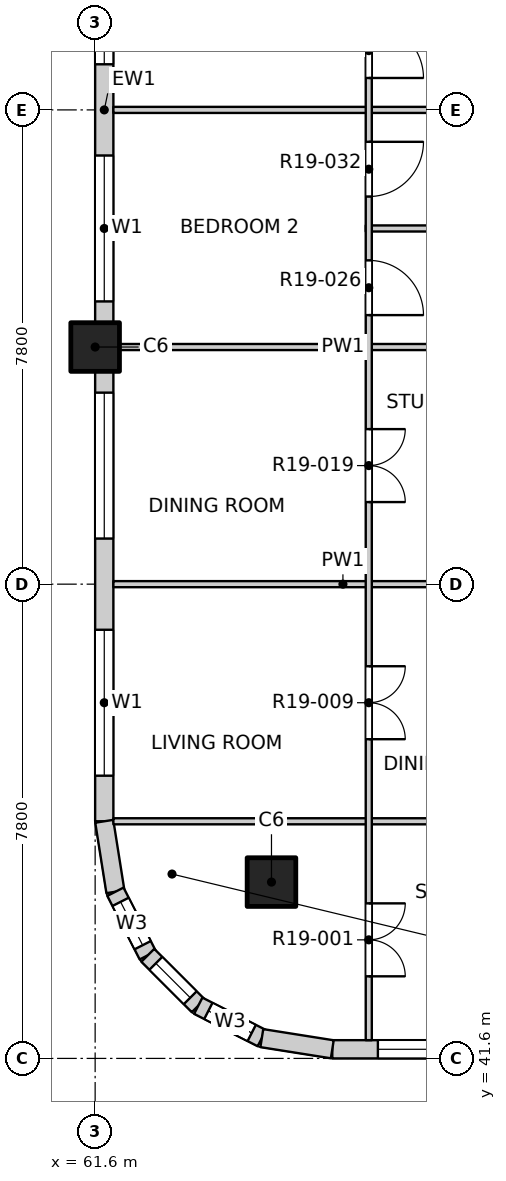
"""IFC4 building model, lengths in metres.
Left out: names, types, materials, properties, quantities, classifications, styles, units other than length and angle.
Written with IfcOpenShell. Run it as: python <this file> out.ifc"""

import sys

from ifc_helpers import new_model, si_unit, direction, frame, frame_2d, origin, origin_2d, place, context, subcontext, project, spatial, rectangle, extrude, element, fill, save


model = new_model("IFC4")
c1 = context("Model", 3, precision=1e-05, world=origin(), true_north=direction((0.0, 1.0)))
c2 = subcontext(c1, "Body", "Model", "MODEL_VIEW")
j1 = project(units=[si_unit("LENGTHUNIT", "METRE"), si_unit("PLANEANGLEUNIT", "RADIAN")], contexts=[c1])
p1 = place(None, origin())
s1 = spatial("IfcSite", under=j1, at=p1, CompositionType="ELEMENT")
p2 = place(p1, origin())
s2 = spatial("IfcBuilding", under=s1, at=p2, CompositionType="ELEMENT")
p3 = place(p2, frame((0.0, 0.0, 197.3)))
s3 = spatial("IfcBuildingStorey", under=s2, at=p3, CompositionType="ELEMENT", Elevation=197.3)
for number, where, z_axis, x_axis in (
    (1, (64.5, 44.5, -0.3), (0.0, 0.0, 1.0), (1.0, 0.0, 0.0)),
    (2, (61.6, 53.3, -0.3), (0.0, 0.0, 1.0), (1.0, 0.0, 0.0)),
):
    element("IfcColumn", number, at=place(p3, frame(where, z_axis=z_axis, x_axis=x_axis)), inside=s3, PredefinedType="COLUMN", context=c2, shape_type="SweptSolid", body=[
        extrude(rectangle(XDim=0.8, YDim=0.8, at=origin_2d()), origin(), (0.0, 0.0, 1.0), 3.45),
    ])
p4 = place(p3, frame((65.5, 41.75, 0.0), z_axis=(0.0, 0.0, 1.0), x_axis=(1.0, 0.0, 0.0)))
e3 = element("IfcWall", 3, at=p4, inside=s3, PredefinedType="SOLIDWALL", context=c2, shape_type="SweptSolid", body=[
    extrude(rectangle(XDim=7.4, YDim=0.3, at=frame_2d((3.7, 0.0))), origin(), (0.0, 0.0, 1.0), 2.7),
])
p5 = place(p4, frame((0.75, 0.0, 0.9)))
e4 = element("IfcOpeningElement", 4, at=p5, cuts=e3, PredefinedType="OPENING", context=c2, shape_type="SweptSolid", body=[
    extrude(rectangle(XDim=2.4, YDim=1.8, at=frame_2d((1.2, 0.9))), frame((0.0, 0.16, 0.0), z_axis=(0.0, -1.0, 0.0), x_axis=(1.0, 0.0, 0.0)), (0.0, 0.0, 1.0), 0.32),
])
p6 = place(p4, frame((4.65, 0.0, 0.9)))
e5 = element("IfcOpeningElement", 5, at=p6, cuts=e3, PredefinedType="OPENING", context=c2, shape_type="SweptSolid", body=[
    extrude(rectangle(XDim=2.4, YDim=1.8, at=frame_2d((1.2, 0.9))), frame((0.0, 0.16, 0.0), z_axis=(0.0, -1.0, 0.0), x_axis=(1.0, 0.0, 0.0)), (0.0, 0.0, 1.0), 0.32),
])
p7 = place(p3, frame((61.75, 45.5, 0.0), z_axis=(0.0, 0.0, 1.0), x_axis=(0.0, 1.0, 0.0)))
e6 = element("IfcWall", 6, at=p7, inside=s3, PredefinedType="SOLIDWALL", context=c2, shape_type="SweptSolid", body=[
    extrude(rectangle(XDim=7.4, YDim=0.3, at=frame_2d((3.7, 0.0))), origin(), (0.0, 0.0, 1.0), 2.7),
])
p8 = place(p7, frame((0.75, 0.0, 0.9)))
e7 = element("IfcOpeningElement", 7, at=p8, cuts=e6, PredefinedType="OPENING", context=c2, shape_type="SweptSolid", body=[
    extrude(rectangle(XDim=2.4, YDim=1.8, at=frame_2d((1.2, 0.9))), frame((0.0, 0.16, 0.0), z_axis=(0.0, -1.0, 0.0), x_axis=(1.0, 0.0, 0.0)), (0.0, 0.0, 1.0), 0.32),
])
p9 = place(p7, frame((4.65, 0.0, 0.9)))
e8 = element("IfcOpeningElement", 8, at=p9, cuts=e6, PredefinedType="OPENING", context=c2, shape_type="SweptSolid", body=[
    extrude(rectangle(XDim=2.4, YDim=1.8, at=frame_2d((1.2, 0.9))), frame((0.0, 0.16, 0.0), z_axis=(0.0, -1.0, 0.0), x_axis=(1.0, 0.0, 0.0)), (0.0, 0.0, 1.0), 0.32),
])
p10 = place(p3, frame((61.75, 53.7, 0.0), z_axis=(0.0, 0.0, 1.0), x_axis=(0.0, 1.0, 0.0)))
e9 = element("IfcWall", 9, at=p10, inside=s3, PredefinedType="SOLIDWALL", context=c2, shape_type="SweptSolid", body=[
    extrude(rectangle(XDim=7.0, YDim=0.3, at=frame_2d((3.5, 0.0))), origin(), (0.0, 0.0, 1.0), 2.7),
])
p11 = place(p10, frame((0.35, 0.0, 0.9)))
e10 = element("IfcOpeningElement", 10, at=p11, cuts=e9, PredefinedType="OPENING", context=c2, shape_type="SweptSolid", body=[
    extrude(rectangle(XDim=2.4, YDim=1.8, at=frame_2d((1.2, 0.9))), frame((0.0, 0.16, 0.0), z_axis=(0.0, -1.0, 0.0), x_axis=(1.0, 0.0, 0.0)), (0.0, 0.0, 1.0), 0.32),
])
p12 = place(p10, frame((4.25, 0.0, 0.9)))
e11 = element("IfcOpeningElement", 11, at=p12, cuts=e9, PredefinedType="OPENING", context=c2, shape_type="SweptSolid", body=[
    extrude(rectangle(XDim=2.4, YDim=1.8, at=frame_2d((1.2, 0.9))), frame((0.0, 0.16, 0.0), z_axis=(0.0, -1.0, 0.0), x_axis=(1.0, 0.0, 0.0)), (0.0, 0.0, 1.0), 0.32),
])
p13 = place(p3, frame((61.75, 45.5, 0.0), z_axis=(0.0, 0.0, 1.0), x_axis=(0.156496880861, -0.987678452879, 0.0)))
e12 = element("IfcWall", 12, at=p13, inside=s3, PredefinedType="SOLIDWALL", context=c2, shape_type="SweptSolid", body=[
    extrude(rectangle(XDim=1.173, YDim=0.3, at=frame_2d((0.586, 0.0))), origin(), (0.0, 0.0, 1.0), 2.7),
])
p14 = place(p3, frame((61.934, 44.341, 0.0), z_axis=(0.0, 0.0, 1.0), x_axis=(0.454025524128, -0.890988677504, 0.0)))
e13 = element("IfcWall", 13, at=p14, inside=s3, PredefinedType="SOLIDWALL", context=c2, shape_type="SweptSolid", body=[
    extrude(rectangle(XDim=1.173, YDim=0.3, at=frame_2d((0.587, 0.0))), origin(), (0.0, 0.0, 1.0), 2.7),
])
p15 = place(p14, frame((0.187, 0.0, 0.9)))
e14 = element("IfcOpeningElement", 14, at=p15, cuts=e13, PredefinedType="OPENING", context=c2, shape_type="SweptSolid", body=[
    extrude(rectangle(XDim=0.8, YDim=1.2, at=frame_2d((0.4, 0.6))), frame((0.0, 0.16, 0.0), z_axis=(0.0, -1.0, 0.0), x_axis=(1.0, 0.0, 0.0)), (0.0, 0.0, 1.0), 0.32),
])
p16 = place(p3, frame((62.466, 43.296, 0.0), z_axis=(0.0, 0.0, 1.0), x_axis=(0.707106781187, -0.707106781187, 0.0)))
e15 = element("IfcWall", 15, at=p16, inside=s3, PredefinedType="SOLIDWALL", context=c2, shape_type="SweptSolid", body=[
    extrude(rectangle(XDim=1.173, YDim=0.3, at=frame_2d((0.586, 0.0))), origin(), (0.0, 0.0, 1.0), 2.7),
])
p17 = place(p16, frame((0.187, 0.0, 0.9)))
e16 = element("IfcOpeningElement", 16, at=p17, cuts=e15, PredefinedType="OPENING", context=c2, shape_type="SweptSolid", body=[
    extrude(rectangle(XDim=0.8, YDim=1.2, at=frame_2d((0.4, 0.6))), frame((0.0, 0.16, 0.0), z_axis=(0.0, -1.0, 0.0), x_axis=(1.0, 0.0, 0.0)), (0.0, 0.0, 1.0), 0.32),
])
p18 = place(p3, frame((63.296, 42.466, 0.0), z_axis=(0.0, 0.0, 1.0), x_axis=(0.890988677504, -0.454025524128, 0.0)))
e17 = element("IfcWall", 17, at=p18, inside=s3, PredefinedType="SOLIDWALL", context=c2, shape_type="SweptSolid", body=[
    extrude(rectangle(XDim=1.173, YDim=0.3, at=frame_2d((0.587, 0.0))), origin(), (0.0, 0.0, 1.0), 2.7),
])
p19 = place(p18, frame((0.187, 0.0, 0.9)))
e18 = element("IfcOpeningElement", 18, at=p19, cuts=e17, PredefinedType="OPENING", context=c2, shape_type="SweptSolid", body=[
    extrude(rectangle(XDim=0.8, YDim=1.2, at=frame_2d((0.4, 0.6))), frame((0.0, 0.16, 0.0), z_axis=(0.0, -1.0, 0.0), x_axis=(1.0, 0.0, 0.0)), (0.0, 0.0, 1.0), 0.32),
])
p20 = place(p3, frame((64.341, 41.934, 0.0), z_axis=(0.0, 0.0, 1.0), x_axis=(0.987678452879, -0.156496880861, 0.0)))
e19 = element("IfcWall", 19, at=p20, inside=s3, PredefinedType="SOLIDWALL", context=c2, shape_type="SweptSolid", body=[
    extrude(rectangle(XDim=1.173, YDim=0.3, at=frame_2d((0.586, 0.0))), origin(), (0.0, 0.0, 1.0), 2.7),
])
p21 = place(p3, frame((61.9, 45.5, 0.0), z_axis=(0.0, 0.0, 1.0), x_axis=(1.0, 0.0, 0.0)))
e20 = element("IfcWall", 20, at=p21, inside=s3, PredefinedType="PARTITIONING", context=c2, shape_type="SweptSolid", body=[
    extrude(rectangle(XDim=11.475, YDim=0.1, at=frame_2d((5.737, 0.0))), origin(), (0.0, 0.0, 1.0), 3.15),
])
p22 = place(p21, frame((7.965, 0.0, 0.0)))
e21 = element("IfcOpeningElement", 21, at=p22, cuts=e20, PredefinedType="OPENING", context=c2, shape_type="SweptSolid", body=[
    extrude(rectangle(XDim=0.9, YDim=2.1, at=frame_2d((0.45, 1.05))), frame((0.0, 0.06, 0.0), z_axis=(0.0, -1.0, 0.0), x_axis=(1.0, 0.0, 0.0)), (0.0, 0.0, 1.0), 0.12),
])
for number, where, z_axis, x_axis in (
    (22, (61.9, 49.4, 0.0), (0.0, 0.0, 1.0), (1.0, 0.0, 0.0)),
    (23, (61.9, 53.3, 0.0), (0.0, 0.0, 1.0), (1.0, 0.0, 0.0)),
):
    element("IfcWall", number, at=place(p3, frame(where, z_axis=z_axis, x_axis=x_axis)), inside=s3, PredefinedType="PARTITIONING", context=c2, shape_type="SweptSolid", body=[
        extrude(rectangle(XDim=7.55, YDim=0.1, at=frame_2d((3.775, 0.0))), origin(), (0.0, 0.0, 1.0), 3.15),
    ])
p23 = place(p3, frame((66.05, 55.25, 0.0), z_axis=(0.0, 0.0, 1.0), x_axis=(1.0, 0.0, 0.0)))
e24 = element("IfcWall", 24, at=p23, inside=s3, PredefinedType="PARTITIONING", context=c2, shape_type="SweptSolid", body=[
    extrude(rectangle(XDim=3.4, YDim=0.1, at=frame_2d((1.7, 0.0))), origin(), (0.0, 0.0, 1.0), 3.15),
])
p24 = place(p3, frame((61.9, 57.2, 0.0), z_axis=(0.0, 0.0, 1.0), x_axis=(1.0, 0.0, 0.0)))
e25 = element("IfcWall", 25, at=p24, inside=s3, PredefinedType="PARTITIONING", context=c2, shape_type="SweptSolid", body=[
    extrude(rectangle(XDim=7.55, YDim=0.1, at=frame_2d((3.775, 0.0))), origin(), (0.0, 0.0, 1.0), 3.15),
])
p25 = place(p3, frame((66.1, 41.9, 0.0), z_axis=(0.0, 0.0, 1.0), x_axis=(0.0, 1.0, 0.0)))
e26 = element("IfcWall", 26, at=p25, inside=s3, PredefinedType="PARTITIONING", context=c2, shape_type="SweptSolid", body=[
    extrude(rectangle(XDim=19.1, YDim=0.1, at=frame_2d((9.55, 0.0))), origin(), (0.0, 0.0, 1.0), 3.15),
])
p26 = place(p25, frame((1.05, 0.0, 0.0)))
e27 = element("IfcOpeningElement", 27, at=p26, cuts=e26, PredefinedType="OPENING", context=c2, shape_type="SweptSolid", body=[
    extrude(rectangle(XDim=1.2, YDim=2.1, at=frame_2d((0.6, 1.05))), frame((0.0, 0.06, 0.0), z_axis=(0.0, -1.0, 0.0), x_axis=(1.0, 0.0, 0.0)), (0.0, 0.0, 1.0), 0.12),
])
p27 = place(p25, frame((4.95, 0.0, 0.0)))
e28 = element("IfcOpeningElement", 28, at=p27, cuts=e26, PredefinedType="OPENING", context=c2, shape_type="SweptSolid", body=[
    extrude(rectangle(XDim=1.2, YDim=2.1, at=frame_2d((0.6, 1.05))), frame((0.0, 0.06, 0.0), z_axis=(0.0, -1.0, 0.0), x_axis=(1.0, 0.0, 0.0)), (0.0, 0.0, 1.0), 0.12),
])
p28 = place(p25, frame((8.85, 0.0, 0.0)))
e29 = element("IfcOpeningElement", 29, at=p28, cuts=e26, PredefinedType="OPENING", context=c2, shape_type="SweptSolid", body=[
    extrude(rectangle(XDim=1.2, YDim=2.1, at=frame_2d((0.6, 1.05))), frame((0.0, 0.06, 0.0), z_axis=(0.0, -1.0, 0.0), x_axis=(1.0, 0.0, 0.0)), (0.0, 0.0, 1.0), 0.12),
])
p29 = place(p25, frame((11.925, 0.0, 0.0)))
e30 = element("IfcOpeningElement", 30, at=p29, cuts=e26, PredefinedType="OPENING", context=c2, shape_type="SweptSolid", body=[
    extrude(rectangle(XDim=0.9, YDim=2.1, at=frame_2d((0.45, 1.05))), frame((0.0, 0.06, 0.0), z_axis=(0.0, -1.0, 0.0), x_axis=(1.0, 0.0, 0.0)), (0.0, 0.0, 1.0), 0.12),
])
p30 = place(p25, frame((13.875, 0.0, 0.0)))
e31 = element("IfcOpeningElement", 31, at=p30, cuts=e26, PredefinedType="OPENING", context=c2, shape_type="SweptSolid", body=[
    extrude(rectangle(XDim=0.9, YDim=2.1, at=frame_2d((0.45, 1.05))), frame((0.0, 0.06, 0.0), z_axis=(0.0, -1.0, 0.0), x_axis=(1.0, 0.0, 0.0)), (0.0, 0.0, 1.0), 0.12),
])
p31 = place(p25, frame((15.825, 0.0, 0.0)))
e32 = element("IfcOpeningElement", 32, at=p31, cuts=e26, PredefinedType="OPENING", context=c2, shape_type="SweptSolid", body=[
    extrude(rectangle(XDim=0.9, YDim=2.1, at=frame_2d((0.45, 1.05))), frame((0.0, 0.06, 0.0), z_axis=(0.0, -1.0, 0.0), x_axis=(1.0, 0.0, 0.0)), (0.0, 0.0, 1.0), 0.12),
])
p32 = place(p25, frame((17.775, 0.0, 0.0)))
e33 = element("IfcOpeningElement", 33, at=p32, cuts=e26, PredefinedType="OPENING", context=c2, shape_type="SweptSolid", body=[
    extrude(rectangle(XDim=0.9, YDim=2.1, at=frame_2d((0.45, 1.05))), frame((0.0, 0.06, 0.0), z_axis=(0.0, -1.0, 0.0), x_axis=(1.0, 0.0, 0.0)), (0.0, 0.0, 1.0), 0.12),
])
p33 = place(p5, origin())
e34 = element("IfcWindow", 34, at=p33, inside=s3, PartitioningType="DOUBLE_PANEL_VERTICAL", PredefinedType="WINDOW", context=c2, shape_type="SweptSolid", body=[
    extrude(rectangle(XDim=2.4, YDim=1.8, at=frame_2d((1.2, 0.9))), frame((0.0, 0.03, 0.0), z_axis=(0.0, -1.0, 0.0), x_axis=(1.0, 0.0, 0.0)), (0.0, 0.0, 1.0), 0.06),
])
fill(e4, e34)
p34 = place(p8, origin())
e35 = element("IfcWindow", 35, at=p34, inside=s3, PartitioningType="DOUBLE_PANEL_VERTICAL", PredefinedType="WINDOW", context=c2, shape_type="SweptSolid", body=[
    extrude(rectangle(XDim=2.4, YDim=1.8, at=frame_2d((1.2, 0.9))), frame((0.0, 0.03, 0.0), z_axis=(0.0, -1.0, 0.0), x_axis=(1.0, 0.0, 0.0)), (0.0, 0.0, 1.0), 0.06),
])
fill(e7, e35)
p35 = place(p9, origin())
e36 = element("IfcWindow", 36, at=p35, inside=s3, PartitioningType="DOUBLE_PANEL_VERTICAL", PredefinedType="WINDOW", context=c2, shape_type="SweptSolid", body=[
    extrude(rectangle(XDim=2.4, YDim=1.8, at=frame_2d((1.2, 0.9))), frame((0.0, 0.03, 0.0), z_axis=(0.0, -1.0, 0.0), x_axis=(1.0, 0.0, 0.0)), (0.0, 0.0, 1.0), 0.06),
])
fill(e8, e36)
p36 = place(p11, origin())
e37 = element("IfcWindow", 37, at=p36, inside=s3, PartitioningType="DOUBLE_PANEL_VERTICAL", PredefinedType="WINDOW", context=c2, shape_type="SweptSolid", body=[
    extrude(rectangle(XDim=2.4, YDim=1.8, at=frame_2d((1.2, 0.9))), frame((0.0, 0.03, 0.0), z_axis=(0.0, -1.0, 0.0), x_axis=(1.0, 0.0, 0.0)), (0.0, 0.0, 1.0), 0.06),
])
fill(e10, e37)
p37 = place(p12, origin())
e38 = element("IfcWindow", 38, at=p37, inside=s3, PartitioningType="DOUBLE_PANEL_VERTICAL", PredefinedType="WINDOW", context=c2, shape_type="SweptSolid", body=[
    extrude(rectangle(XDim=2.4, YDim=1.8, at=frame_2d((1.2, 0.9))), frame((0.0, 0.03, 0.0), z_axis=(0.0, -1.0, 0.0), x_axis=(1.0, 0.0, 0.0)), (0.0, 0.0, 1.0), 0.06),
])
fill(e11, e38)
p38 = place(p15, origin())
e39 = element("IfcWindow", 39, at=p38, inside=s3, PartitioningType="SINGLE_PANEL", PredefinedType="WINDOW", context=c2, shape_type="SweptSolid", body=[
    extrude(rectangle(XDim=0.8, YDim=1.2, at=frame_2d((0.4, 0.6))), frame((0.0, 0.03, 0.0), z_axis=(0.0, -1.0, 0.0), x_axis=(1.0, 0.0, 0.0)), (0.0, 0.0, 1.0), 0.06),
])
fill(e14, e39)
p39 = place(p17, origin())
e40 = element("IfcWindow", 40, at=p39, inside=s3, PartitioningType="SINGLE_PANEL", PredefinedType="WINDOW", context=c2, shape_type="SweptSolid", body=[
    extrude(rectangle(XDim=0.8, YDim=1.2, at=frame_2d((0.4, 0.6))), frame((0.0, 0.03, 0.0), z_axis=(0.0, -1.0, 0.0), x_axis=(1.0, 0.0, 0.0)), (0.0, 0.0, 1.0), 0.06),
])
fill(e16, e40)
p40 = place(p19, origin())
e41 = element("IfcWindow", 41, at=p40, inside=s3, PartitioningType="SINGLE_PANEL", PredefinedType="WINDOW", context=c2, shape_type="SweptSolid", body=[
    extrude(rectangle(XDim=0.8, YDim=1.2, at=frame_2d((0.4, 0.6))), frame((0.0, 0.03, 0.0), z_axis=(0.0, -1.0, 0.0), x_axis=(1.0, 0.0, 0.0)), (0.0, 0.0, 1.0), 0.06),
])
fill(e18, e41)
p41 = place(p26, origin())
e42 = element("IfcDoor", 42, at=p41, inside=s3, OperationType="DOUBLE_DOOR_SINGLE_SWING", PredefinedType="DOOR", context=c2, shape_type="SweptSolid", body=[
    extrude(rectangle(XDim=1.2, YDim=2.1, at=frame_2d((0.6, 1.05))), frame((0.0, 0.025, 0.0), z_axis=(0.0, -1.0, 0.0), x_axis=(1.0, 0.0, 0.0)), (0.0, 0.0, 1.0), 0.05),
])
fill(e27, e42)
p42 = place(p27, origin())
e43 = element("IfcDoor", 43, at=p42, inside=s3, OperationType="DOUBLE_DOOR_SINGLE_SWING", PredefinedType="DOOR", context=c2, shape_type="SweptSolid", body=[
    extrude(rectangle(XDim=1.2, YDim=2.1, at=frame_2d((0.6, 1.05))), frame((0.0, 0.025, 0.0), z_axis=(0.0, -1.0, 0.0), x_axis=(1.0, 0.0, 0.0)), (0.0, 0.0, 1.0), 0.05),
])
fill(e28, e43)
p43 = place(p28, origin())
e44 = element("IfcDoor", 44, at=p43, inside=s3, OperationType="DOUBLE_DOOR_SINGLE_SWING", PredefinedType="DOOR", context=c2, shape_type="SweptSolid", body=[
    extrude(rectangle(XDim=1.2, YDim=2.1, at=frame_2d((0.6, 1.05))), frame((0.0, 0.025, 0.0), z_axis=(0.0, -1.0, 0.0), x_axis=(1.0, 0.0, 0.0)), (0.0, 0.0, 1.0), 0.05),
])
fill(e29, e44)
p44 = place(p29, origin())
e45 = element("IfcDoor", 45, at=p44, inside=s3, OperationType="SINGLE_SWING_RIGHT", PredefinedType="DOOR", context=c2, shape_type="SweptSolid", body=[
    extrude(rectangle(XDim=0.9, YDim=2.1, at=frame_2d((0.45, 1.05))), frame((0.0, 0.025, 0.0), z_axis=(0.0, -1.0, 0.0), x_axis=(1.0, 0.0, 0.0)), (0.0, 0.0, 1.0), 0.05),
])
fill(e30, e45)
p45 = place(p30, origin())
e46 = element("IfcDoor", 46, at=p45, inside=s3, OperationType="SINGLE_SWING_LEFT", PredefinedType="DOOR", context=c2, shape_type="SweptSolid", body=[
    extrude(rectangle(XDim=0.9, YDim=2.1, at=frame_2d((0.45, 1.05))), frame((0.0, 0.025, 0.0), z_axis=(0.0, -1.0, 0.0), x_axis=(1.0, 0.0, 0.0)), (0.0, 0.0, 1.0), 0.05),
])
fill(e31, e46)
p46 = place(p31, origin())
e47 = element("IfcDoor", 47, at=p46, inside=s3, OperationType="SINGLE_SWING_RIGHT", PredefinedType="DOOR", context=c2, shape_type="SweptSolid", body=[
    extrude(rectangle(XDim=0.9, YDim=2.1, at=frame_2d((0.45, 1.05))), frame((0.0, 0.025, 0.0), z_axis=(0.0, -1.0, 0.0), x_axis=(1.0, 0.0, 0.0)), (0.0, 0.0, 1.0), 0.05),
])
fill(e32, e47)
save(model, sys.argv[1])
